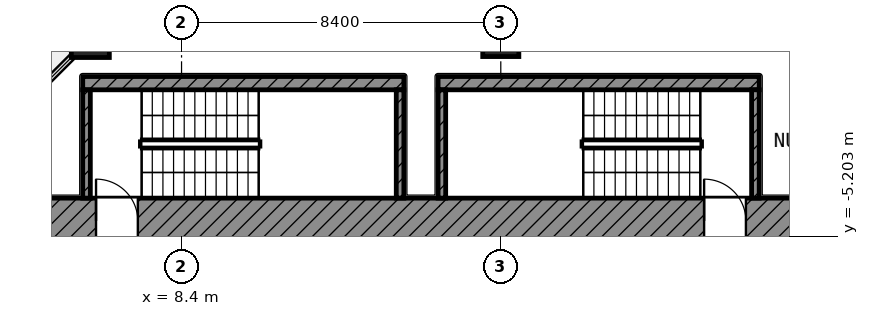
"""IFC4 building model, lengths in metres.
Left out: names, types, materials, properties, quantities, classifications, styles, units other than length and angle.
Written with IfcOpenShell. Run it as: python <this file> out.ifc"""

import sys

from ifc_helpers import new_model, si_unit, direction, frame, frame_2d, origin, origin_2d, place, context, subcontext, project, spatial, rectangle, extrude, element, fill, save


model = new_model("IFC4")
c1 = context("Model", 3, precision=1e-05, world=origin(), true_north=direction((0.0, 1.0)))
c2 = subcontext(c1, "Body", "Model", "MODEL_VIEW")
j1 = project(units=[si_unit("LENGTHUNIT", "METRE"), si_unit("PLANEANGLEUNIT", "RADIAN")], contexts=[c1])
p1 = place(None, origin())
s1 = spatial("IfcSite", under=j1, at=p1, CompositionType="ELEMENT")
p2 = place(p1, origin())
s2 = spatial("IfcBuilding", under=s1, at=p2, CompositionType="ELEMENT")
p3 = place(p2, frame((0.0, 0.0, 183.6)))
s3 = spatial("IfcBuildingStorey", under=s2, at=p3, CompositionType="ELEMENT", Elevation=183.6)
p4 = place(p3, frame((6.0, 0.0, 0.0), z_axis=(0.0, 0.0, 1.0), x_axis=(1.0, 0.0, 0.0)))
e1 = element("IfcColumn", 1, at=p4, inside=s3, PredefinedType="COLUMN", context=c2, shape_type="SweptSolid", body=[
    extrude(rectangle(XDim=1.0, YDim=1.0, at=origin_2d()), origin(), (0.0, 0.0, 1.0), 4.2),
])
p5 = place(p3, frame((16.8, 0.0, 0.0), z_axis=(0.0, 0.0, 1.0), x_axis=(1.0, 0.0, 0.0)))
e2 = element("IfcColumn", 2, at=p5, inside=s3, PredefinedType="COLUMN", context=c2, shape_type="SweptSolid", body=[
    extrude(rectangle(XDim=0.95, YDim=0.95, at=origin_2d()), origin(), (0.0, 0.0, 1.0), 4.2),
])
p6 = place(p3, frame((4.2, -4.8, 0.0), z_axis=(0.0, 0.0, 1.0), x_axis=(1.0, 0.0, 0.0)))
e3 = element("IfcWall", 3, at=p6, inside=s3, PredefinedType="SHEAR", context=c2, shape_type="SweptSolid", body=[
    extrude(rectangle(XDim=20.7, YDim=1.2, at=frame_2d((10.35, 0.0))), origin(), (0.0, 0.0, 1.0), 3.6),
])
p7 = place(p6, frame((1.95, 0.0, 0.0)))
e4 = element("IfcOpeningElement", 4, at=p7, cuts=e3, PredefinedType="OPENING", context=c2, shape_type="SweptSolid", body=[
    extrude(rectangle(XDim=1.1, YDim=2.1, at=frame_2d((0.55, 1.05))), frame((0.0, 0.61, 0.0), z_axis=(0.0, -1.0, 0.0), x_axis=(1.0, 0.0, 0.0)), (0.0, 0.0, 1.0), 1.22),
])
p8 = place(p6, frame((17.95, 0.0, 0.0)))
e5 = element("IfcOpeningElement", 5, at=p8, cuts=e3, PredefinedType="OPENING", context=c2, shape_type="SweptSolid", body=[
    extrude(rectangle(XDim=1.1, YDim=2.1, at=frame_2d((0.55, 1.05))), frame((0.0, 0.61, 0.0), z_axis=(0.0, -1.0, 0.0), x_axis=(1.0, 0.0, 0.0)), (0.0, 0.0, 1.0), 1.22),
])
p9 = place(p3, frame((5.8, -1.175, 0.0), z_axis=(0.0, 0.0, 1.0), x_axis=(1.0, 0.0, 0.0)))
e6 = element("IfcWall", 6, at=p9, inside=s3, PredefinedType="SHEAR", context=c2, shape_type="SweptSolid", body=[
    extrude(rectangle(XDim=8.45, YDim=0.35, at=frame_2d((4.225, 0.0))), origin(), (0.0, 0.0, 1.0), 3.6),
])
for number, where, z_axis, x_axis in (
    (7, (5.9, -4.2, 0.0), (0.0, 0.0, 1.0), (0.0, 1.0, 0.0)),
    (8, (14.15, -4.2, 0.0), (0.0, 0.0, 1.0), (0.0, 1.0, 0.0)),
):
    element("IfcWall", number, at=place(p3, frame(where, z_axis=z_axis, x_axis=x_axis)), inside=s3, PredefinedType="SHEAR", context=c2, shape_type="SweptSolid", body=[
        extrude(rectangle(XDim=2.85, YDim=0.2, at=frame_2d((1.425, 0.0))), origin(), (0.0, 0.0, 1.0), 3.6),
    ])
p10 = place(p3, frame((15.15, -1.175, 0.0), z_axis=(0.0, 0.0, 1.0), x_axis=(1.0, 0.0, 0.0)))
e9 = element("IfcWall", 9, at=p10, inside=s3, PredefinedType="SHEAR", context=c2, shape_type="SweptSolid", body=[
    extrude(rectangle(XDim=8.45, YDim=0.35, at=frame_2d((4.225, 0.0))), origin(), (0.0, 0.0, 1.0), 3.6),
])
for number, where, z_axis, x_axis in (
    (10, (15.25, -4.2, 0.0), (0.0, 0.0, 1.0), (0.0, 1.0, 0.0)),
    (11, (23.5, -4.2, 0.0), (0.0, 0.0, 1.0), (0.0, 1.0, 0.0)),
):
    element("IfcWall", number, at=place(p3, frame(where, z_axis=z_axis, x_axis=x_axis)), inside=s3, PredefinedType="SHEAR", context=c2, shape_type="SweptSolid", body=[
        extrude(rectangle(XDim=2.85, YDim=0.2, at=frame_2d((1.425, 0.0))), origin(), (0.0, 0.0, 1.0), 3.6),
    ])
p11 = place(p7, origin())
e12 = element("IfcDoor", 12, at=p11, inside=s3, OperationType="SINGLE_SWING_LEFT", PredefinedType="DOOR", context=c2, shape_type="SweptSolid", body=[
    extrude(rectangle(XDim=1.1, YDim=2.1, at=frame_2d((0.55, 1.05))), frame((0.0, 0.025, 0.0), z_axis=(0.0, -1.0, 0.0), x_axis=(1.0, 0.0, 0.0)), (0.0, 0.0, 1.0), 0.05),
])
fill(e4, e12)
p12 = place(p8, origin())
e13 = element("IfcDoor", 13, at=p12, inside=s3, OperationType="SINGLE_SWING_LEFT", PredefinedType="DOOR", context=c2, shape_type="SweptSolid", body=[
    extrude(rectangle(XDim=1.1, YDim=2.1, at=frame_2d((0.55, 1.05))), frame((0.0, 0.025, 0.0), z_axis=(0.0, -1.0, 0.0), x_axis=(1.0, 0.0, 0.0)), (0.0, 0.0, 1.0), 0.05),
])
fill(e5, e13)
save(model, sys.argv[1])
